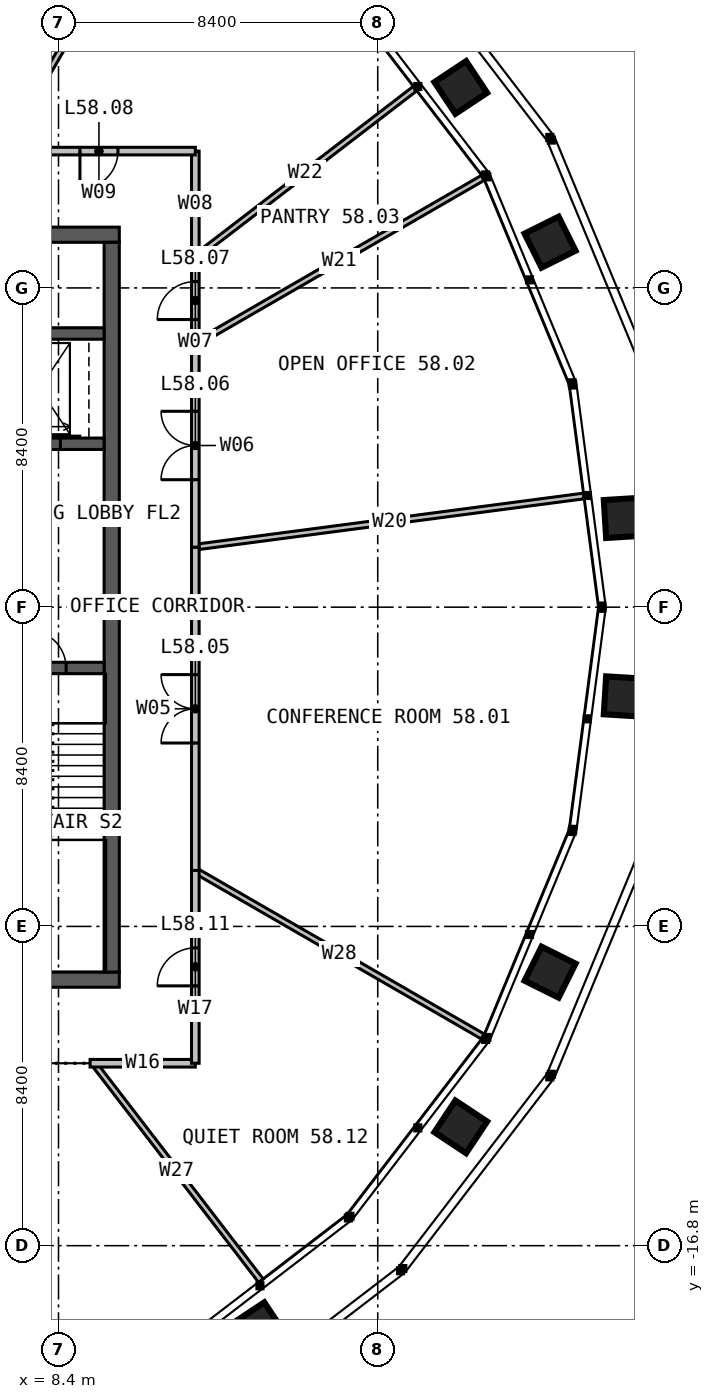
"""IFC4 building model, lengths in metres.
Left out: names, types, materials, properties, quantities, classifications, styles, units other than length and angle.
Written with IfcOpenShell. Run it as: python <this file> out.ifc"""

import sys

from ifc_helpers import new_model, si_unit, direction, frame, frame_2d, origin, place, context, subcontext, project, spatial, rectangle, extrude, element, fill, save


model = new_model("IFC4")
c1 = context("Model", 3, precision=1e-05, world=origin(), true_north=direction((0.0, 1.0)))
c2 = subcontext(c1, "Body", "Model", "MODEL_VIEW")
j1 = project(units=[si_unit("LENGTHUNIT", "METRE"), si_unit("PLANEANGLEUNIT", "RADIAN")], contexts=[c1])
p1 = place(None, origin())
s1 = spatial("IfcSite", under=j1, at=p1, CompositionType="ELEMENT")
p2 = place(p1, origin())
s2 = spatial("IfcBuilding", under=s1, at=p2, CompositionType="ELEMENT")
p3 = place(p2, frame((0.0, 0.0, 240.0)))
s3 = spatial("IfcBuildingStorey", under=s2, at=p3, CompositionType="ELEMENT", Elevation=240.0)
p4 = place(p3, frame((-10.0, 9.8, 0.0), z_axis=(0.0, 0.0, 1.0), x_axis=(1.0, 0.0, 0.0)))
e1 = element("IfcWall", 1, at=p4, inside=s3, PredefinedType="SOLIDWALL", context=c2, shape_type="SweptSolid", body=[
    extrude(rectangle(XDim=20.0, YDim=0.4, at=frame_2d((10.0, 0.0))), origin(), (0.0, 0.0, 1.0), 4.0),
])
p5 = place(p4, frame((9.4, 0.0, 0.0)))
e2 = element("IfcOpeningElement", 2, at=p5, cuts=e1, PredefinedType="OPENING", context=c2, shape_type="SweptSolid", body=[
    extrude(rectangle(XDim=1.2, YDim=2.2, at=frame_2d((0.6, 1.1))), frame((0.0, 0.21, 0.0), z_axis=(0.0, -1.0, 0.0), x_axis=(1.0, 0.0, 0.0)), (0.0, 0.0, 1.0), 0.42),
])
p6 = place(p3, frame((10.0, -9.8, 0.0), z_axis=(0.0, 0.0, 1.0), x_axis=(-1.0, 0.0, 0.0)))
e3 = element("IfcWall", 3, at=p6, inside=s3, PredefinedType="SOLIDWALL", context=c2, shape_type="SweptSolid", body=[
    extrude(rectangle(XDim=20.0, YDim=0.4, at=frame_2d((10.0, 0.0))), origin(), (0.0, 0.0, 1.0), 4.0),
])
p7 = place(p6, frame((6.875, 0.0, 0.0)))
e4 = element("IfcOpeningElement", 4, at=p7, cuts=e3, PredefinedType="OPENING", context=c2, shape_type="SweptSolid", body=[
    extrude(rectangle(XDim=1.2, YDim=2.2, at=frame_2d((0.6, 1.1))), frame((0.0, 0.21, 0.0), z_axis=(0.0, -1.0, 0.0), x_axis=(1.0, 0.0, 0.0)), (0.0, 0.0, 1.0), 0.42),
])
p8 = place(p3, frame((9.8, -9.6, 0.0), z_axis=(0.0, 0.0, 1.0), x_axis=(0.0, 1.0, 0.0)))
e5 = element("IfcWall", 5, at=p8, inside=s3, PredefinedType="SOLIDWALL", context=c2, shape_type="SweptSolid", body=[
    extrude(rectangle(XDim=19.2, YDim=0.4, at=frame_2d((9.6, 0.0))), origin(), (0.0, 0.0, 1.0), 4.0),
])
p9 = place(p3, frame((6.6, -1.6, 0.0), z_axis=(0.0, 0.0, 1.0), x_axis=(1.0, 0.0, 0.0)))
e6 = element("IfcWall", 6, at=p9, inside=s3, PredefinedType="SOLIDWALL", context=c2, shape_type="SweptSolid", body=[
    extrude(rectangle(XDim=3.0, YDim=0.3, at=frame_2d((1.5, 0.0))), origin(), (0.0, 0.0, 1.0), 4.0),
])
p10 = place(p9, frame((1.0, 0.0, 0.0)))
e7 = element("IfcOpeningElement", 7, at=p10, cuts=e6, PredefinedType="OPENING", context=c2, shape_type="SweptSolid", body=[
    extrude(rectangle(XDim=1.0, YDim=2.2, at=frame_2d((0.5, 1.1))), frame((0.0, 0.16, 0.0), z_axis=(0.0, -1.0, 0.0), x_axis=(1.0, 0.0, 0.0)), (0.0, 0.0, 1.0), 0.32),
])
p11 = place(p3, frame((6.6, 4.3, 0.0), z_axis=(0.0, 0.0, 1.0), x_axis=(1.0, 0.0, 0.0)))
e8 = element("IfcWall", 8, at=p11, inside=s3, PredefinedType="SOLIDWALL", context=c2, shape_type="SweptSolid", body=[
    extrude(rectangle(XDim=3.0, YDim=0.3, at=frame_2d((1.5, 0.0))), origin(), (0.0, 0.0, 1.0), 4.0),
])
p12 = place(p11, frame((0.75, 0.0, 0.0)))
e9 = element("IfcOpeningElement", 9, at=p12, cuts=e8, PredefinedType="OPENING", context=c2, shape_type="SweptSolid", body=[
    extrude(rectangle(XDim=1.1, YDim=2.2, at=frame_2d((0.55, 1.1))), frame((0.0, 0.16, 0.0), z_axis=(0.0, -1.0, 0.0), x_axis=(1.0, 0.0, 0.0)), (0.0, 0.0, 1.0), 0.32),
])
p13 = place(p3, frame((6.6, 7.2, 0.0), z_axis=(0.0, 0.0, 1.0), x_axis=(1.0, 0.0, 0.0)))
e10 = element("IfcWall", 10, at=p13, inside=s3, PredefinedType="SOLIDWALL", context=c2, shape_type="SweptSolid", body=[
    extrude(rectangle(XDim=3.0, YDim=0.3, at=frame_2d((1.5, 0.0))), origin(), (0.0, 0.0, 1.0), 4.0),
])
p14 = place(p3, frame((12.0, -6.928, 0.0), z_axis=(0.0, 0.0, 1.0), x_axis=(0.866020224182, -0.500008971228, 0.0)))
e11 = element("IfcWall", 11, at=p14, inside=s3, PredefinedType="PARTITIONING", context=c2, shape_type="SweptSolid", body=[
    extrude(rectangle(XDim=8.753, YDim=0.15, at=frame_2d((4.376, 0.0))), origin(), (0.0, 0.0, 1.0), 2.79),
])
p15 = place(p3, frame((12.0, 1.58, 0.0), z_axis=(0.0, 0.0, 1.0), x_axis=(0.991445913099, 0.130518203327, 0.0)))
e12 = element("IfcWall", 12, at=p15, inside=s3, PredefinedType="PARTITIONING", context=c2, shape_type="SweptSolid", body=[
    extrude(rectangle(XDim=10.312, YDim=0.15, at=frame_2d((5.156, 0.0))), origin(), (0.0, 0.0, 1.0), 2.79),
])
p16 = place(p3, frame((12.0, 6.928, 0.0), z_axis=(0.0, 0.0, 1.0), x_axis=(0.866020224182, 0.500008971228, 0.0)))
e13 = element("IfcWall", 13, at=p16, inside=s3, PredefinedType="PARTITIONING", context=c2, shape_type="SweptSolid", body=[
    extrude(rectangle(XDim=8.753, YDim=0.15, at=frame_2d((4.376, 0.0))), origin(), (0.0, 0.0, 1.0), 2.79),
])
p17 = place(p3, frame((12.0, 9.208, 0.0), z_axis=(0.0, 0.0, 1.0), x_axis=(0.793369131671, 0.608740848729, 0.0)))
e14 = element("IfcWall", 14, at=p17, inside=s3, PredefinedType="PARTITIONING", context=c2, shape_type="SweptSolid", body=[
    extrude(rectangle(XDim=7.29, YDim=0.15, at=frame_2d((3.645, 0.0))), origin(), (0.0, 0.0, 1.0), 2.79),
])
p18 = place(p3, frame((6.928, 12.0, 0.0), z_axis=(0.0, 0.0, 1.0), x_axis=(0.500008971228, 0.866020224182, 0.0)))
e15 = element("IfcWall", 15, at=p18, inside=s3, PredefinedType="PARTITIONING", context=c2, shape_type="SweptSolid", body=[
    extrude(rectangle(XDim=8.753, YDim=0.15, at=frame_2d((4.376, 0.0))), origin(), (0.0, 0.0, 1.0), 2.79),
])
p19 = place(p3, frame((9.29, -11.954, 0.0), z_axis=(0.0, 0.0, 1.0), x_axis=(0.609736705343, -0.792604031126, 0.0)))
e16 = element("IfcWall", 16, at=p19, inside=s3, PredefinedType="PARTITIONING", context=c2, shape_type="SweptSolid", body=[
    extrude(rectangle(XDim=7.276, YDim=0.15, at=frame_2d((3.638, 0.0))), origin(), (0.0, 0.0, 1.0), 2.79),
])
p20 = place(p3, frame((12.0, -6.928, 0.0), z_axis=(0.0, 0.0, 1.0), x_axis=(0.0, 1.0, 0.0)))
e17 = element("IfcWall", 17, at=p20, inside=s3, PredefinedType="PARTITIONING", context=c2, shape_type="SweptSolid", body=[
    extrude(rectangle(XDim=8.508, YDim=0.2, at=frame_2d((4.254, 0.0))), origin(), (0.0, 0.0, 1.0), 3.8),
])
p21 = place(p20, frame((3.354, 0.0, 0.0)))
e18 = element("IfcOpeningElement", 18, at=p21, cuts=e17, PredefinedType="OPENING", context=c2, shape_type="SweptSolid", body=[
    extrude(rectangle(XDim=1.8, YDim=2.2, at=frame_2d((0.9, 1.1))), frame((0.0, 0.11, 0.0), z_axis=(0.0, -1.0, 0.0), x_axis=(1.0, 0.0, 0.0)), (0.0, 0.0, 1.0), 0.22),
])
p22 = place(p3, frame((12.0, 1.58, 0.0), z_axis=(0.0, 0.0, 1.0), x_axis=(0.0, 1.0, 0.0)))
e19 = element("IfcWall", 19, at=p22, inside=s3, PredefinedType="PARTITIONING", context=c2, shape_type="SweptSolid", body=[
    extrude(rectangle(XDim=5.348, YDim=0.2, at=frame_2d((2.674, 0.0))), origin(), (0.0, 0.0, 1.0), 3.8),
])
p23 = place(p22, frame((1.774, 0.0, 0.0)))
e20 = element("IfcOpeningElement", 20, at=p23, cuts=e19, PredefinedType="OPENING", context=c2, shape_type="SweptSolid", body=[
    extrude(rectangle(XDim=1.8, YDim=2.2, at=frame_2d((0.9, 1.1))), frame((0.0, 0.11, 0.0), z_axis=(0.0, -1.0, 0.0), x_axis=(1.0, 0.0, 0.0)), (0.0, 0.0, 1.0), 0.22),
])
p24 = place(p3, frame((12.0, 6.928, 0.0), z_axis=(0.0, 0.0, 1.0), x_axis=(0.0, 1.0, 0.0)))
e21 = element("IfcWall", 21, at=p24, inside=s3, PredefinedType="PARTITIONING", context=c2, shape_type="SweptSolid", body=[
    extrude(rectangle(XDim=2.28, YDim=0.2, at=frame_2d((1.14, 0.0))), origin(), (0.0, 0.0, 1.0), 3.8),
])
p25 = place(p24, frame((0.64, 0.0, 0.0)))
e22 = element("IfcOpeningElement", 22, at=p25, cuts=e21, PredefinedType="OPENING", context=c2, shape_type="SweptSolid", body=[
    extrude(rectangle(XDim=1.0, YDim=2.2, at=frame_2d((0.5, 1.1))), frame((0.0, 0.11, 0.0), z_axis=(0.0, -1.0, 0.0), x_axis=(1.0, 0.0, 0.0)), (0.0, 0.0, 1.0), 0.22),
])
p26 = place(p3, frame((12.0, 9.208, 0.0), z_axis=(0.0, 0.0, 1.0), x_axis=(0.0, 1.0, 0.0)))
e23 = element("IfcWall", 23, at=p26, inside=s3, PredefinedType="PARTITIONING", context=c2, shape_type="SweptSolid", body=[
    extrude(rectangle(XDim=2.792, YDim=0.2, at=frame_2d((1.396, 0.0))), origin(), (0.0, 0.0, 1.0), 3.8),
])
p27 = place(p3, frame((12.0, 12.0, 0.0), z_axis=(0.0, 0.0, 1.0), x_axis=(-1.0, 0.0, 0.0)))
e24 = element("IfcWall", 24, at=p27, inside=s3, PredefinedType="PARTITIONING", context=c2, shape_type="SweptSolid", body=[
    extrude(rectangle(XDim=5.072, YDim=0.2, at=frame_2d((2.536, 0.0))), origin(), (0.0, 0.0, 1.0), 3.8),
])
p28 = place(p27, frame((2.036, 0.0, 0.0)))
e25 = element("IfcOpeningElement", 25, at=p28, cuts=e24, PredefinedType="OPENING", context=c2, shape_type="SweptSolid", body=[
    extrude(rectangle(XDim=1.0, YDim=2.2, at=frame_2d((0.5, 1.1))), frame((0.0, 0.11, 0.0), z_axis=(0.0, -1.0, 0.0), x_axis=(1.0, 0.0, 0.0)), (0.0, 0.0, 1.0), 0.22),
])
p29 = place(p3, frame((9.231, -12.0, 0.0), z_axis=(0.0, 0.0, 1.0), x_axis=(1.0, 0.0, 0.0)))
e26 = element("IfcWall", 26, at=p29, inside=s3, PredefinedType="PARTITIONING", context=c2, shape_type="SweptSolid", body=[
    extrude(rectangle(XDim=2.769, YDim=0.2, at=frame_2d((1.385, 0.0))), origin(), (0.0, 0.0, 1.0), 3.8),
])
p30 = place(p3, frame((12.0, -12.0, 0.0), z_axis=(0.0, 0.0, 1.0), x_axis=(0.0, 1.0, 0.0)))
e27 = element("IfcWall", 27, at=p30, inside=s3, PredefinedType="PARTITIONING", context=c2, shape_type="SweptSolid", body=[
    extrude(rectangle(XDim=5.072, YDim=0.2, at=frame_2d((2.536, 0.0))), origin(), (0.0, 0.0, 1.0), 3.8),
])
p31 = place(p30, frame((2.036, 0.0, 0.0)))
e28 = element("IfcOpeningElement", 28, at=p31, cuts=e27, PredefinedType="OPENING", context=c2, shape_type="SweptSolid", body=[
    extrude(rectangle(XDim=1.0, YDim=2.2, at=frame_2d((0.5, 1.1))), frame((0.0, 0.11, 0.0), z_axis=(0.0, -1.0, 0.0), x_axis=(1.0, 0.0, 0.0)), (0.0, 0.0, 1.0), 0.22),
])
p32 = place(p10, origin())
e29 = element("IfcDoor", 29, at=p32, inside=s3, OperationType="SINGLE_SWING_LEFT", PredefinedType="DOOR", context=c2, shape_type="SweptSolid", body=[
    extrude(rectangle(XDim=1.0, YDim=2.2, at=frame_2d((0.5, 1.1))), frame((0.0, 0.025, 0.0), z_axis=(0.0, -1.0, 0.0), x_axis=(1.0, 0.0, 0.0)), (0.0, 0.0, 1.0), 0.05),
])
fill(e7, e29)
p33 = place(p12, origin())
e30 = element("IfcDoor", 30, at=p33, inside=s3, OperationType="SLIDING_TO_LEFT", PredefinedType="DOOR", context=c2, shape_type="SweptSolid", body=[
    extrude(rectangle(XDim=1.1, YDim=2.2, at=frame_2d((0.55, 1.1))), frame((0.0, 0.025, 0.0), z_axis=(0.0, -1.0, 0.0), x_axis=(1.0, 0.0, 0.0)), (0.0, 0.0, 1.0), 0.05),
])
fill(e9, e30)
p34 = place(p21, origin())
e31 = element("IfcDoor", 31, at=p34, inside=s3, OperationType="DOUBLE_DOOR_SINGLE_SWING", PredefinedType="DOOR", context=c2, shape_type="SweptSolid", body=[
    extrude(rectangle(XDim=1.8, YDim=2.2, at=frame_2d((0.9, 1.1))), frame((0.0, 0.025, 0.0), z_axis=(0.0, -1.0, 0.0), x_axis=(1.0, 0.0, 0.0)), (0.0, 0.0, 1.0), 0.05),
])
fill(e18, e31)
p35 = place(p23, origin())
e32 = element("IfcDoor", 32, at=p35, inside=s3, OperationType="DOUBLE_DOOR_SINGLE_SWING", PredefinedType="DOOR", context=c2, shape_type="SweptSolid", body=[
    extrude(rectangle(XDim=1.8, YDim=2.2, at=frame_2d((0.9, 1.1))), frame((0.0, 0.025, 0.0), z_axis=(0.0, -1.0, 0.0), x_axis=(1.0, 0.0, 0.0)), (0.0, 0.0, 1.0), 0.05),
])
fill(e20, e32)
p36 = place(p25, origin())
e33 = element("IfcDoor", 33, at=p36, inside=s3, OperationType="SINGLE_SWING_LEFT", PredefinedType="DOOR", context=c2, shape_type="SweptSolid", body=[
    extrude(rectangle(XDim=1.0, YDim=2.2, at=frame_2d((0.5, 1.1))), frame((0.0, 0.025, 0.0), z_axis=(0.0, -1.0, 0.0), x_axis=(1.0, 0.0, 0.0)), (0.0, 0.0, 1.0), 0.05),
])
fill(e22, e33)
p37 = place(p28, origin())
e34 = element("IfcDoor", 34, at=p37, inside=s3, OperationType="SINGLE_SWING_RIGHT", PredefinedType="DOOR", context=c2, shape_type="SweptSolid", body=[
    extrude(rectangle(XDim=1.0, YDim=2.2, at=frame_2d((0.5, 1.1))), frame((0.0, 0.025, 0.0), z_axis=(0.0, -1.0, 0.0), x_axis=(1.0, 0.0, 0.0)), (0.0, 0.0, 1.0), 0.05),
])
fill(e25, e34)
p38 = place(p31, origin())
e35 = element("IfcDoor", 35, at=p38, inside=s3, OperationType="SINGLE_SWING_LEFT", PredefinedType="DOOR", context=c2, shape_type="SweptSolid", body=[
    extrude(rectangle(XDim=1.0, YDim=2.2, at=frame_2d((0.5, 1.1))), frame((0.0, 0.025, 0.0), z_axis=(0.0, -1.0, 0.0), x_axis=(1.0, 0.0, 0.0)), (0.0, 0.0, 1.0), 0.05),
])
fill(e28, e35)
save(model, sys.argv[1])
